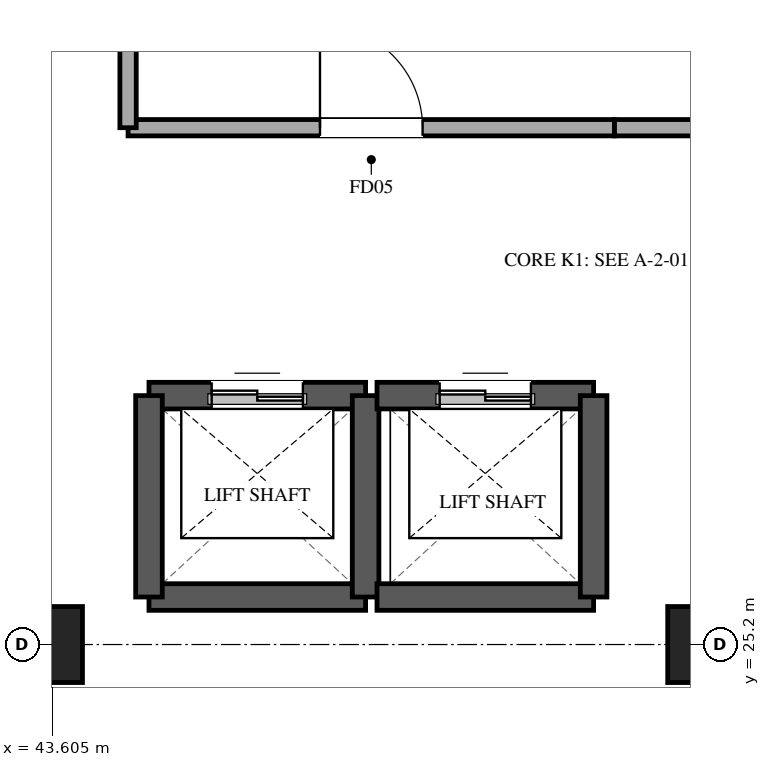
"""IFC4 building model, lengths in metres.
Left out: names, types, materials, properties, quantities, classifications, styles, units other than length and angle.
Written with IfcOpenShell. Run it as: python <this file> out.ifc"""

import sys

from ifc_helpers import new_model, si_unit, direction, frame, frame_2d, origin, origin_2d, place, context, subcontext, project, spatial, rectangle, extrude, element, fill, save


model = new_model("IFC4")
c1 = context("Model", 3, precision=1e-05, world=origin(), true_north=direction((0.0, 1.0)))
c2 = subcontext(c1, "Body", "Model", "MODEL_VIEW")
j1 = project(units=[si_unit("LENGTHUNIT", "METRE"), si_unit("PLANEANGLEUNIT", "RADIAN")], contexts=[c1])
p1 = place(None, origin())
s1 = spatial("IfcSite", under=j1, at=p1, CompositionType="ELEMENT")
p2 = place(p1, origin())
s2 = spatial("IfcBuilding", under=s1, at=p2, CompositionType="ELEMENT")
p3 = place(p2, frame((0.0, 0.0, -4.8)))
s3 = spatial("IfcBuildingStorey", under=s2, at=p3, CompositionType="ELEMENT", Elevation=-4.8)
for number, where, z_axis, x_axis in (
    (1, (43.5, 25.2, 0.0), (0.0, 0.0, 1.0), (1.0, 0.0, 0.0)),
    (2, (52.2, 25.2, 0.0), (0.0, 0.0, 1.0), (1.0, 0.0, 0.0)),
):
    element("IfcColumn", number, at=place(p3, frame(where, z_axis=z_axis, x_axis=x_axis)), inside=s3, PredefinedType="COLUMN", context=c2, shape_type="SweptSolid", body=[
        extrude(rectangle(XDim=1.0, YDim=1.0, at=origin_2d()), origin(), (0.0, 0.0, 1.0), 4.8),
    ])
p4 = place(p3, frame((44.875, 28.475, 0.0), z_axis=(0.0, 0.0, 1.0), x_axis=(1.0, 0.0, 0.0)))
e3 = element("IfcWall", 3, at=p4, inside=s3, PredefinedType="SHEAR", context=c2, shape_type="SweptSolid", body=[
    extrude(rectangle(XDim=2.85, YDim=0.35, at=frame_2d((1.425, 0.0))), origin(), (0.0, 0.0, 1.0), 4.8),
])
p5 = place(p4, frame((0.825, 0.0, 0.0)))
e4 = element("IfcOpeningElement", 4, at=p5, cuts=e3, PredefinedType="OPENING", context=c2, shape_type="SweptSolid", body=[
    extrude(rectangle(XDim=1.2, YDim=2.2, at=frame_2d((0.6, 1.1))), frame((0.0, 0.185, 0.0), z_axis=(0.0, -1.0, 0.0), x_axis=(1.0, 0.0, 0.0)), (0.0, 0.0, 1.0), 0.37),
])
p6 = place(p3, frame((47.725, 25.825, 0.0), z_axis=(0.0, 0.0, 1.0), x_axis=(-1.0, 0.0, 0.0)))
e5 = element("IfcWall", 5, at=p6, inside=s3, PredefinedType="SHEAR", context=c2, shape_type="SweptSolid", body=[
    extrude(rectangle(XDim=2.85, YDim=0.35, at=frame_2d((1.425, 0.0))), origin(), (0.0, 0.0, 1.0), 4.8),
])
for number, where, z_axis, x_axis in (
    (6, (44.875, 25.825, 0.0), (0.0, 0.0, 1.0), (0.0, 1.0, 0.0)),
    (7, (47.725, 28.475, 0.0), (0.0, 0.0, 1.0), (0.0, -1.0, 0.0)),
):
    element("IfcWall", number, at=place(p3, frame(where, z_axis=z_axis, x_axis=x_axis)), inside=s3, PredefinedType="SHEAR", context=c2, shape_type="SweptSolid", body=[
        extrude(rectangle(XDim=2.65, YDim=0.35, at=frame_2d((1.325, 0.0))), origin(), (0.0, 0.0, 1.0), 4.8),
    ])
p7 = place(p3, frame((47.875, 28.475, 0.0), z_axis=(0.0, 0.0, 1.0), x_axis=(1.0, 0.0, 0.0)))
e8 = element("IfcWall", 8, at=p7, inside=s3, PredefinedType="SHEAR", context=c2, shape_type="SweptSolid", body=[
    extrude(rectangle(XDim=2.85, YDim=0.35, at=frame_2d((1.425, 0.0))), origin(), (0.0, 0.0, 1.0), 4.8),
])
p8 = place(p7, frame((0.825, 0.0, 0.0)))
e9 = element("IfcOpeningElement", 9, at=p8, cuts=e8, PredefinedType="OPENING", context=c2, shape_type="SweptSolid", body=[
    extrude(rectangle(XDim=1.2, YDim=2.2, at=frame_2d((0.6, 1.1))), frame((0.0, 0.185, 0.0), z_axis=(0.0, -1.0, 0.0), x_axis=(1.0, 0.0, 0.0)), (0.0, 0.0, 1.0), 0.37),
])
p9 = place(p3, frame((50.725, 25.825, 0.0), z_axis=(0.0, 0.0, 1.0), x_axis=(-1.0, 0.0, 0.0)))
e10 = element("IfcWall", 10, at=p9, inside=s3, PredefinedType="SHEAR", context=c2, shape_type="SweptSolid", body=[
    extrude(rectangle(XDim=2.85, YDim=0.35, at=frame_2d((1.425, 0.0))), origin(), (0.0, 0.0, 1.0), 4.8),
])
p10 = place(p3, frame((50.725, 28.475, 0.0), z_axis=(0.0, 0.0, 1.0), x_axis=(0.0, -1.0, 0.0)))
e11 = element("IfcWall", 11, at=p10, inside=s3, PredefinedType="SHEAR", context=c2, shape_type="SweptSolid", body=[
    extrude(rectangle(XDim=2.65, YDim=0.35, at=frame_2d((1.325, 0.0))), origin(), (0.0, 0.0, 1.0), 4.8),
])
p11 = place(p3, frame((44.6, 32.0, 0.0), z_axis=(0.0, 0.0, 1.0), x_axis=(1.0, 0.0, 0.0)))
e12 = element("IfcWall", 12, at=p11, inside=s3, PredefinedType="PARTITIONING", context=c2, shape_type="SweptSolid", body=[
    extrude(rectangle(XDim=6.4, YDim=0.215, at=frame_2d((3.2, 0.0))), origin(), (0.0, 0.0, 1.0), 4.44),
])
p12 = place(p11, frame((2.525, 0.0, 0.0)))
e13 = element("IfcOpeningElement", 13, at=p12, cuts=e12, PredefinedType="OPENING", context=c2, shape_type="SweptSolid", body=[
    extrude(rectangle(XDim=1.35, YDim=2.2, at=frame_2d((0.675, 1.1))), frame((0.0, 0.118, 0.0), z_axis=(0.0, -1.0, 0.0), x_axis=(1.0, 0.0, 0.0)), (0.0, 0.0, 1.0), 0.235),
])
p13 = place(p3, frame((44.6, 32.0, 0.0), z_axis=(0.0, 0.0, 1.0), x_axis=(0.0, 1.0, 0.0)))
e14 = element("IfcWall", 14, at=p13, inside=s3, PredefinedType="PARTITIONING", context=c2, shape_type="SweptSolid", body=[
    extrude(rectangle(XDim=2.98, YDim=0.215, at=frame_2d((1.49, 0.0))), origin(), (0.0, 0.0, 1.0), 3.65),
])
p14 = place(p3, frame((52.8, 32.0, 0.0), z_axis=(0.0, 0.0, 1.0), x_axis=(-1.0, 0.0, 0.0)))
e15 = element("IfcWall", 15, at=p14, inside=s3, PredefinedType="PARTITIONING", context=c2, shape_type="SweptSolid", body=[
    extrude(rectangle(XDim=1.8, YDim=0.215, at=frame_2d((0.9, 0.0))), origin(), (0.0, 0.0, 1.0), 3.65),
])
p15 = place(p5, origin())
e16 = element("IfcDoor", 16, at=p15, inside=s3, OperationType="DOUBLE_DOOR_SLIDING", PredefinedType="DOOR", context=c2, shape_type="SweptSolid", body=[
    extrude(rectangle(XDim=1.2, YDim=2.2, at=frame_2d((0.6, 1.1))), frame((0.0, 0.025, 0.0), z_axis=(0.0, -1.0, 0.0), x_axis=(1.0, 0.0, 0.0)), (0.0, 0.0, 1.0), 0.05),
])
fill(e4, e16)
p16 = place(p8, origin())
e17 = element("IfcDoor", 17, at=p16, inside=s3, OperationType="DOUBLE_DOOR_SLIDING", PredefinedType="DOOR", context=c2, shape_type="SweptSolid", body=[
    extrude(rectangle(XDim=1.2, YDim=2.2, at=frame_2d((0.6, 1.1))), frame((0.0, 0.025, 0.0), z_axis=(0.0, -1.0, 0.0), x_axis=(1.0, 0.0, 0.0)), (0.0, 0.0, 1.0), 0.05),
])
fill(e9, e17)
p17 = place(p12, origin())
e18 = element("IfcDoor", 18, at=p17, inside=s3, OperationType="SINGLE_SWING_LEFT", PredefinedType="DOOR", context=c2, shape_type="SweptSolid", body=[
    extrude(rectangle(XDim=1.35, YDim=2.2, at=frame_2d((0.675, 1.1))), frame((0.0, 0.025, 0.0), z_axis=(0.0, -1.0, 0.0), x_axis=(1.0, 0.0, 0.0)), (0.0, 0.0, 1.0), 0.05),
])
fill(e13, e18)
save(model, sys.argv[1])
